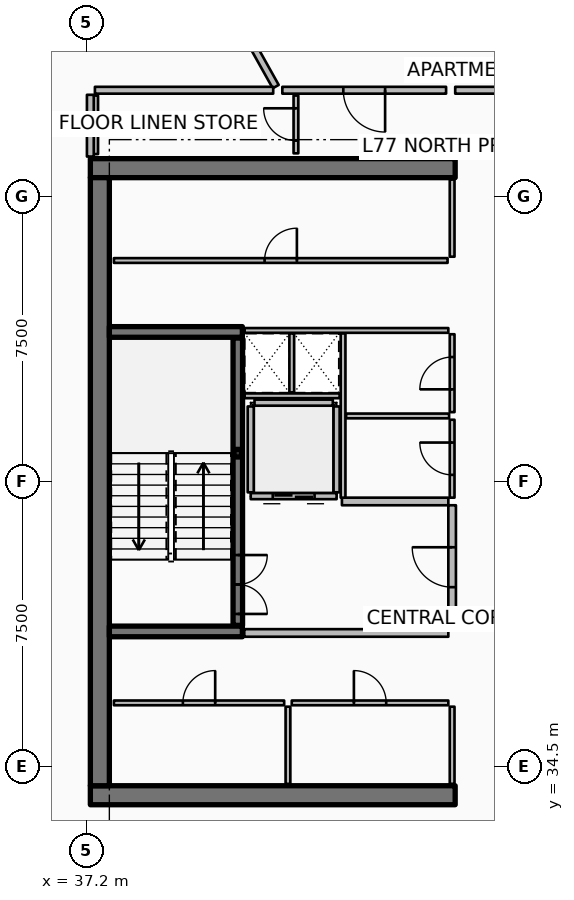
"""IFC4 building model, lengths in metres.
Left out: names, types, materials, properties, quantities, classifications, styles, units other than length and angle.
Written with IfcOpenShell. Run it as: python <this file> out.ifc"""

import sys

from ifc_helpers import new_model, si_unit, direction, frame, frame_2d, origin, origin_2d, place, context, subcontext, project, spatial, rectangle, hollow_rectangle, extrude, element, fill, save


model = new_model("IFC4")
c1 = context("Model", 3, precision=1e-05, world=origin(), true_north=direction((0.0, 1.0)))
c2 = subcontext(c1, "Body", "Model", "MODEL_VIEW")
j1 = project(units=[si_unit("LENGTHUNIT", "METRE"), si_unit("PLANEANGLEUNIT", "RADIAN")], contexts=[c1])
p1 = place(None, origin())
s1 = spatial("IfcSite", under=j1, at=p1, CompositionType="ELEMENT")
p2 = place(p1, origin())
s2 = spatial("IfcBuilding", under=s1, at=p2, CompositionType="ELEMENT")
p3 = place(p2, frame((0.0, 0.0, 306.0)))
s3 = spatial("IfcBuildingStorey", under=s2, at=p3, CompositionType="ELEMENT", Elevation=306.0)
for number, where, z_axis, x_axis in (
    (1, (37.3, 33.75, 0.0), (0.0, 0.0, 1.0), (1.0, 0.0, 0.0)),
    (2, (37.3, 50.25, 0.0), (0.0, 0.0, 1.0), (1.0, 0.0, 0.0)),
):
    element("IfcWall", number, at=place(p3, frame(where, z_axis=z_axis, x_axis=x_axis)), inside=s3, PredefinedType="SHEAR", context=c2, shape_type="SweptSolid", body=[
        extrude(rectangle(XDim=9.6, YDim=0.5, at=frame_2d((4.8, 0.0))), origin(), (0.0, 0.0, 1.0), 3.85),
    ])
p4 = place(p3, frame((37.55, 34.0, 0.0), z_axis=(0.0, 0.0, 1.0), x_axis=(0.0, 1.0, 0.0)))
e3 = element("IfcWall", 3, at=p4, inside=s3, PredefinedType="SHEAR", context=c2, shape_type="SweptSolid", body=[
    extrude(rectangle(XDim=16.0, YDim=0.5, at=frame_2d((8.0, 0.0))), origin(), (0.0, 0.0, 1.0), 3.85),
])
for number, where, z_axis, x_axis in (
    (4, (37.8, 38.06, 0.0), (0.0, 0.0, 1.0), (1.0, 0.0, 0.0)),
    (5, (37.8, 45.94, 0.0), (0.0, 0.0, 1.0), (1.0, 0.0, 0.0)),
):
    element("IfcWall", number, at=place(p3, frame(where, z_axis=z_axis, x_axis=x_axis)), inside=s3, PredefinedType="SHEAR", context=c2, shape_type="SweptSolid", body=[
        extrude(rectangle(XDim=3.5, YDim=0.28, at=frame_2d((1.75, 0.0))), origin(), (0.0, 0.0, 1.0), 3.85),
    ])
p5 = place(p3, frame((41.18, 42.75, 0.0), z_axis=(0.0, 0.0, 1.0), x_axis=(1.0, 0.0, 0.0)))
e6 = element("IfcColumn", 6, at=p5, inside=s3, PredefinedType="COLUMN", context=c2, shape_type="SweptSolid", body=[
    extrude(hollow_rectangle(XDim=0.2, YDim=0.2, WallThickness=0.01, InnerFilletRadius=0.01, OuterFilletRadius=0.02, at=origin_2d()), origin(), (0.0, 0.0, 1.0), 1.72),
])
p6 = place(p3, frame((41.18, 38.22, 0.0), z_axis=(0.0, 0.0, 1.0), x_axis=(0.0, 1.0, 0.0)))
e7 = element("IfcWall", 7, at=p6, inside=s3, PredefinedType="SOLIDWALL", context=c2, shape_type="SweptSolid", body=[
    extrude(rectangle(XDim=7.56, YDim=0.25, at=frame_2d((3.78, 0.0))), origin(), (0.0, 0.0, 1.0), 3.45),
])
p7 = place(p6, frame((0.3, 0.0, 0.0)))
e8 = element("IfcOpeningElement", 8, at=p7, cuts=e7, PredefinedType="OPENING", context=c2, shape_type="SweptSolid", body=[
    extrude(rectangle(XDim=1.55, YDim=2.15, at=frame_2d((0.775, 1.075))), frame((0.0, 0.135, 0.0), z_axis=(0.0, -1.0, 0.0), x_axis=(1.0, 0.0, 0.0)), (0.0, 0.0, 1.0), 0.27),
])
p8 = place(p3, frame((43.78, 41.62, 0.0), z_axis=(0.0, 0.0, 1.0), x_axis=(-1.0, 0.0, 0.0)))
e9 = element("IfcWall", 9, at=p8, inside=s3, PredefinedType="PARTITIONING", context=c2, shape_type="SweptSolid", body=[
    extrude(rectangle(XDim=2.26, YDim=0.16, at=frame_2d((1.13, 0.0))), origin(), (0.0, 0.0, 1.0), 3.45),
])
p9 = place(p8, frame((0.58, 0.0, 0.0)))
e10 = element("IfcOpeningElement", 10, at=p9, cuts=e9, PredefinedType="OPENING", context=c2, shape_type="SweptSolid", body=[
    extrude(rectangle(XDim=1.1, YDim=2.1, at=frame_2d((0.55, 1.05))), frame((0.0, 0.09, 0.0), z_axis=(0.0, -1.0, 0.0), x_axis=(1.0, 0.0, 0.0)), (0.0, 0.0, 1.0), 0.18),
])
for number, where, z_axis, x_axis in (
    (11, (43.78, 41.72, 0.0), (0.0, 0.0, 1.0), (0.0, 1.0, 0.0)),
    (12, (41.52, 41.72, 0.0), (0.0, 0.0, 1.0), (0.0, 1.0, 0.0)),
):
    element("IfcWall", number, at=place(p3, frame(where, z_axis=z_axis, x_axis=x_axis)), inside=s3, PredefinedType="PARTITIONING", context=c2, shape_type="SweptSolid", body=[
        extrude(rectangle(XDim=2.26, YDim=0.16, at=frame_2d((1.13, 0.0))), origin(), (0.0, 0.0, 1.0), 3.45),
    ])
p10 = place(p3, frame((41.62, 44.08, 0.0), z_axis=(0.0, 0.0, 1.0), x_axis=(1.0, 0.0, 0.0)))
e13 = element("IfcWall", 13, at=p10, inside=s3, PredefinedType="PARTITIONING", context=c2, shape_type="SweptSolid", body=[
    extrude(rectangle(XDim=2.06, YDim=0.16, at=frame_2d((1.03, 0.0))), origin(), (0.0, 0.0, 1.0), 3.45),
])
for number, where, z_axis, x_axis in (
    (14, (46.82, 34.05, 0.0), (0.0, 0.0, 1.0), (0.0, 1.0, 0.0)),
    (15, (42.5, 34.05, 0.0), (0.0, 0.0, 1.0), (0.0, 1.0, 0.0)),
):
    element("IfcWall", number, at=place(p3, frame(where, z_axis=z_axis, x_axis=x_axis)), inside=s3, PredefinedType="PARTITIONING", context=c2, shape_type="SweptSolid", body=[
        extrude(rectangle(XDim=2.03, YDim=0.125, at=frame_2d((1.015, 0.0))), origin(), (0.0, 0.0, 1.0), 2.89),
    ])
p11 = place(p3, frame((37.92, 36.18, 0.0), z_axis=(0.0, 0.0, 1.0), x_axis=(1.0, 0.0, 0.0)))
e16 = element("IfcWall", 16, at=p11, inside=s3, PredefinedType="PARTITIONING", context=c2, shape_type="SweptSolid", body=[
    extrude(rectangle(XDim=4.48, YDim=0.125, at=frame_2d((2.24, 0.0))), origin(), (0.0, 0.0, 1.0), 2.89),
])
p12 = place(p11, frame((1.815, 0.0, 0.0)))
e17 = element("IfcOpeningElement", 17, at=p12, cuts=e16, PredefinedType="OPENING", context=c2, shape_type="SweptSolid", body=[
    extrude(rectangle(XDim=0.85, YDim=2.06, at=frame_2d((0.425, 1.03))), frame((0.0, 0.073, 0.0), z_axis=(0.0, -1.0, 0.0), x_axis=(1.0, 0.0, 0.0)), (0.0, 0.0, 1.0), 0.145),
])
p13 = place(p3, frame((42.6, 36.18, 0.0), z_axis=(0.0, 0.0, 1.0), x_axis=(1.0, 0.0, 0.0)))
e18 = element("IfcWall", 18, at=p13, inside=s3, PredefinedType="PARTITIONING", context=c2, shape_type="SweptSolid", body=[
    extrude(rectangle(XDim=4.12, YDim=0.125, at=frame_2d((2.06, 0.0))), origin(), (0.0, 0.0, 1.0), 2.89),
])
p14 = place(p13, frame((1.635, 0.0, 0.0)))
e19 = element("IfcOpeningElement", 19, at=p14, cuts=e18, PredefinedType="OPENING", context=c2, shape_type="SweptSolid", body=[
    extrude(rectangle(XDim=0.85, YDim=2.06, at=frame_2d((0.425, 1.03))), frame((0.0, 0.073, 0.0), z_axis=(0.0, -1.0, 0.0), x_axis=(1.0, 0.0, 0.0)), (0.0, 0.0, 1.0), 0.145),
])
p15 = place(p3, frame((46.82, 47.92, 0.0), z_axis=(0.0, 0.0, 1.0), x_axis=(0.0, 1.0, 0.0)))
e20 = element("IfcWall", 20, at=p15, inside=s3, PredefinedType="PARTITIONING", context=c2, shape_type="SweptSolid", body=[
    extrude(rectangle(XDim=2.03, YDim=0.125, at=frame_2d((1.015, 0.0))), origin(), (0.0, 0.0, 1.0), 2.89),
])
p16 = place(p3, frame((37.92, 47.82, 0.0), z_axis=(0.0, 0.0, 1.0), x_axis=(1.0, 0.0, 0.0)))
e21 = element("IfcWall", 21, at=p16, inside=s3, PredefinedType="PARTITIONING", context=c2, shape_type="SweptSolid", body=[
    extrude(rectangle(XDim=8.78, YDim=0.125, at=frame_2d((4.39, 0.0))), origin(), (0.0, 0.0, 1.0), 2.89),
])
p17 = place(p16, frame((3.965, 0.0, 0.0)))
e22 = element("IfcOpeningElement", 22, at=p17, cuts=e21, PredefinedType="OPENING", context=c2, shape_type="SweptSolid", body=[
    extrude(rectangle(XDim=0.85, YDim=2.06, at=frame_2d((0.425, 1.03))), frame((0.0, 0.073, 0.0), z_axis=(0.0, -1.0, 0.0), x_axis=(1.0, 0.0, 0.0)), (0.0, 0.0, 1.0), 0.145),
])
p18 = place(p3, frame((41.35, 38.02, 0.0), z_axis=(0.0, 0.0, 1.0), x_axis=(1.0, 0.0, 0.0)))
e23 = element("IfcWall", 23, at=p18, inside=s3, PredefinedType="PARTITIONING", context=c2, shape_type="SweptSolid", body=[
    extrude(rectangle(XDim=5.37, YDim=0.2, at=frame_2d((2.685, 0.0))), origin(), (0.0, 0.0, 1.0), 3.45),
])
p19 = place(p3, frame((43.92, 41.48, 0.0), z_axis=(0.0, 0.0, 1.0), x_axis=(1.0, 0.0, 0.0)))
e24 = element("IfcWall", 24, at=p19, inside=s3, PredefinedType="PARTITIONING", context=c2, shape_type="SweptSolid", body=[
    extrude(rectangle(XDim=2.8, YDim=0.2, at=frame_2d((1.4, 0.0))), origin(), (0.0, 0.0, 1.0), 3.45),
])
p20 = place(p3, frame((46.82, 38.12, 0.0), z_axis=(0.0, 0.0, 1.0), x_axis=(0.0, 1.0, 0.0)))
e25 = element("IfcWall", 25, at=p20, inside=s3, PredefinedType="PARTITIONING", context=c2, shape_type="SweptSolid", body=[
    extrude(rectangle(XDim=3.26, YDim=0.2, at=frame_2d((1.63, 0.0))), origin(), (0.0, 0.0, 1.0), 3.45),
])
p21 = place(p20, frame((1.105, 0.0, 0.0)))
e26 = element("IfcOpeningElement", 26, at=p21, cuts=e25, PredefinedType="OPENING", context=c2, shape_type="SweptSolid", body=[
    extrude(rectangle(XDim=1.05, YDim=2.1, at=frame_2d((0.525, 1.05))), frame((0.0, 0.11, 0.0), z_axis=(0.0, -1.0, 0.0), x_axis=(1.0, 0.0, 0.0)), (0.0, 0.0, 1.0), 0.22),
])
p22 = place(p3, frame((41.36, 45.98, 0.0), z_axis=(0.0, 0.0, 1.0), x_axis=(1.0, 0.0, 0.0)))
e27 = element("IfcWall", 27, at=p22, inside=s3, PredefinedType="PARTITIONING", context=c2, shape_type="SweptSolid", body=[
    extrude(rectangle(XDim=5.36, YDim=0.125, at=frame_2d((2.68, 0.0))), origin(), (0.0, 0.0, 1.0), 2.89),
])
p23 = place(p3, frame((41.36, 44.26, 0.0), z_axis=(0.0, 0.0, 1.0), x_axis=(1.0, 0.0, 0.0)))
e28 = element("IfcWall", 28, at=p23, inside=s3, PredefinedType="PARTITIONING", context=c2, shape_type="SweptSolid", body=[
    extrude(rectangle(XDim=2.5, YDim=0.125, at=frame_2d((1.25, 0.0))), origin(), (0.0, 0.0, 1.0), 2.89),
])
p24 = place(p3, frame((42.6, 44.35, 0.0), z_axis=(0.0, 0.0, 1.0), x_axis=(0.0, 1.0, 0.0)))
e29 = element("IfcWall", 29, at=p24, inside=s3, PredefinedType="PARTITIONING", context=c2, shape_type="SweptSolid", body=[
    extrude(rectangle(XDim=1.55, YDim=0.125, at=frame_2d((0.775, 0.0))), origin(), (0.0, 0.0, 1.0), 2.89),
])
p25 = place(p3, frame((43.95, 41.58, 0.0), z_axis=(0.0, 0.0, 1.0), x_axis=(0.0, 1.0, 0.0)))
e30 = element("IfcWall", 30, at=p25, inside=s3, PredefinedType="PARTITIONING", context=c2, shape_type="SweptSolid", body=[
    extrude(rectangle(XDim=4.32, YDim=0.125, at=frame_2d((2.16, 0.0))), origin(), (0.0, 0.0, 1.0), 2.89),
])
p26 = place(p3, frame((44.03, 43.73, 0.0), z_axis=(0.0, 0.0, 1.0), x_axis=(1.0, 0.0, 0.0)))
e31 = element("IfcWall", 31, at=p26, inside=s3, PredefinedType="PARTITIONING", context=c2, shape_type="SweptSolid", body=[
    extrude(rectangle(XDim=2.71, YDim=0.125, at=frame_2d((1.355, 0.0))), origin(), (0.0, 0.0, 1.0), 2.89),
])
p27 = place(p3, frame((46.82, 41.58, 0.0), z_axis=(0.0, 0.0, 1.0), x_axis=(0.0, 1.0, 0.0)))
e32 = element("IfcWall", 32, at=p27, inside=s3, PredefinedType="PARTITIONING", context=c2, shape_type="SweptSolid", body=[
    extrude(rectangle(XDim=2.05, YDim=0.125, at=frame_2d((1.025, 0.0))), origin(), (0.0, 0.0, 1.0), 2.89),
])
p28 = place(p27, frame((0.6, 0.0, 0.0)))
e33 = element("IfcOpeningElement", 33, at=p28, cuts=e32, PredefinedType="OPENING", context=c2, shape_type="SweptSolid", body=[
    extrude(rectangle(XDim=0.85, YDim=2.06, at=frame_2d((0.425, 1.03))), frame((0.0, 0.073, 0.0), z_axis=(0.0, -1.0, 0.0), x_axis=(1.0, 0.0, 0.0)), (0.0, 0.0, 1.0), 0.145),
])
p29 = place(p3, frame((46.82, 43.83, 0.0), z_axis=(0.0, 0.0, 1.0), x_axis=(0.0, 1.0, 0.0)))
e34 = element("IfcWall", 34, at=p29, inside=s3, PredefinedType="PARTITIONING", context=c2, shape_type="SweptSolid", body=[
    extrude(rectangle(XDim=2.05, YDim=0.125, at=frame_2d((1.025, 0.0))), origin(), (0.0, 0.0, 1.0), 2.89),
])
p30 = place(p29, frame((0.6, 0.0, 0.0)))
e35 = element("IfcOpeningElement", 35, at=p30, cuts=e34, PredefinedType="OPENING", context=c2, shape_type="SweptSolid", body=[
    extrude(rectangle(XDim=0.85, YDim=2.06, at=frame_2d((0.425, 1.03))), frame((0.0, 0.073, 0.0), z_axis=(0.0, -1.0, 0.0), x_axis=(1.0, 0.0, 0.0)), (0.0, 0.0, 1.0), 0.145),
])
p31 = place(p3, frame((37.44, 50.62, 0.0), z_axis=(0.0, 0.0, 1.0), x_axis=(0.0, 1.0, 0.0)))
e36 = element("IfcWall", 36, at=p31, inside=s3, PredefinedType="PARTITIONING", context=c2, shape_type="SweptSolid", body=[
    extrude(rectangle(XDim=1.54, YDim=0.125, at=frame_2d((0.77, 0.0))), origin(), (0.0, 0.0, 1.0), 2.407),
])
p32 = place(p3, frame((42.71, 50.64, 0.0), z_axis=(0.0, 0.0, 1.0), x_axis=(0.0, 1.0, 0.0)))
e37 = element("IfcWall", 37, at=p32, inside=s3, PredefinedType="PARTITIONING", context=c2, shape_type="SweptSolid", body=[
    extrude(rectangle(XDim=1.52, YDim=0.125, at=frame_2d((0.76, 0.0))), origin(), (0.0, 0.0, 1.0), 2.407),
])
p33 = place(p32, frame((0.335, 0.0, 0.0)))
e38 = element("IfcOpeningElement", 38, at=p33, cuts=e37, PredefinedType="OPENING", context=c2, shape_type="SweptSolid", body=[
    extrude(rectangle(XDim=0.85, YDim=2.06, at=frame_2d((0.425, 1.03))), frame((0.0, 0.073, 0.0), z_axis=(0.0, -1.0, 0.0), x_axis=(1.0, 0.0, 0.0)), (0.0, 0.0, 1.0), 0.145),
])
p34 = place(p3, frame((42.178, 52.396, 0.0), z_axis=(0.0, 0.0, 1.0), x_axis=(-0.488621436647, 0.872495897783, 0.0)))
e39 = element("IfcWall", 39, at=p34, inside=s3, PredefinedType="PARTITIONING", context=c2, shape_type="SweptSolid", body=[
    extrude(rectangle(XDim=11.521, YDim=0.18, at=frame_2d((5.76, 0.0))), origin(), (0.0, 0.0, 1.0), 2.407),
])
p35 = place(p3, frame((46.661, 52.3, 0.0), z_axis=(0.0, 0.0, 1.0), x_axis=(-1.0, 0.0, 0.0)))
e40 = element("IfcWall", 40, at=p35, inside=s3, PredefinedType="PARTITIONING", context=c2, shape_type="SweptSolid", body=[
    extrude(rectangle(XDim=4.309, YDim=0.18, at=frame_2d((2.155, 0.0))), origin(), (0.0, 0.0, 1.0), 2.407),
])
p36 = place(p35, frame((1.604, 0.0, 0.0)))
e41 = element("IfcOpeningElement", 41, at=p36, cuts=e40, PredefinedType="OPENING", context=c2, shape_type="SweptSolid", body=[
    extrude(rectangle(XDim=1.1, YDim=2.1, at=frame_2d((0.55, 1.05))), frame((0.0, 0.1, 0.0), z_axis=(0.0, -1.0, 0.0), x_axis=(1.0, 0.0, 0.0)), (0.0, 0.0, 1.0), 0.2),
])
p37 = place(p3, frame((50.785, 52.3, 0.0), z_axis=(0.0, 0.0, 1.0), x_axis=(-1.0, 0.0, 0.0)))
e42 = element("IfcWall", 42, at=p37, inside=s3, PredefinedType="PARTITIONING", context=c2, shape_type="SweptSolid", body=[
    extrude(rectangle(XDim=3.884, YDim=0.18, at=frame_2d((1.942, 0.0))), origin(), (0.0, 0.0, 1.0), 2.407),
])
p38 = place(p3, frame((42.112, 52.3, 0.0), z_axis=(0.0, 0.0, 1.0), x_axis=(-1.0, 0.0, 0.0)))
e43 = element("IfcWall", 43, at=p38, inside=s3, PredefinedType="PARTITIONING", context=c2, shape_type="SweptSolid", body=[
    extrude(rectangle(XDim=4.692, YDim=0.18, at=frame_2d((2.346, 0.0))), origin(), (0.0, 0.0, 1.0), 2.407),
])
p39 = place(p3, frame((37.3, 52.18, 0.0), z_axis=(0.0, 0.0, 1.0), x_axis=(0.0, -1.0, 0.0)))
e44 = element("IfcWall", 44, at=p39, inside=s3, PredefinedType="PARTITIONING", context=c2, shape_type="SweptSolid", body=[
    extrude(rectangle(XDim=1.625, YDim=0.18, at=frame_2d((0.812, 0.0))), origin(), (0.0, 0.0, 1.0), 2.407),
])
p40 = place(p3, frame((37.242, 55.847, 0.0), z_axis=(0.0, 0.0, 1.0), x_axis=(-0.711391624602, -0.702795814192, 0.0)))
e45 = element("IfcWall", 45, at=p40, inside=s3, PredefinedType="PARTITIONING", context=c2, shape_type="SweptSolid", body=[
    extrude(rectangle(XDim=4.147, YDim=0.125, at=frame_2d((2.073, 0.0))), origin(), (0.0, 0.0, 1.0), 2.407),
])
p41 = place(p40, frame((1.623, 0.0, 0.0)))
e46 = element("IfcOpeningElement", 46, at=p41, cuts=e45, PredefinedType="OPENING", context=c2, shape_type="SweptSolid", body=[
    extrude(rectangle(XDim=0.9, YDim=2.08, at=frame_2d((0.45, 1.04))), frame((0.0, 0.073, 0.0), z_axis=(0.0, -1.0, 0.0), x_axis=(1.0, 0.0, 0.0)), (0.0, 0.0, 1.0), 0.145),
])
p42 = place(p7, origin())
e47 = element("IfcDoor", 47, at=p42, inside=s3, OperationType="DOUBLE_DOOR_SINGLE_SWING", PredefinedType="DOOR", context=c2, shape_type="SweptSolid", body=[
    extrude(rectangle(XDim=1.55, YDim=2.15, at=frame_2d((0.775, 1.075))), frame((0.0, 0.025, 0.0), z_axis=(0.0, -1.0, 0.0), x_axis=(1.0, 0.0, 0.0)), (0.0, 0.0, 1.0), 0.05),
])
fill(e8, e47)
p43 = place(p9, origin())
e48 = element("IfcDoor", 48, at=p43, inside=s3, OperationType="DOUBLE_DOOR_SLIDING", PredefinedType="DOOR", context=c2, shape_type="SweptSolid", body=[
    extrude(rectangle(XDim=1.1, YDim=2.1, at=frame_2d((0.55, 1.05))), frame((0.0, 0.025, 0.0), z_axis=(0.0, -1.0, 0.0), x_axis=(1.0, 0.0, 0.0)), (0.0, 0.0, 1.0), 0.05),
])
fill(e10, e48)
p44 = place(p12, origin())
e49 = element("IfcDoor", 49, at=p44, inside=s3, OperationType="SINGLE_SWING_RIGHT", PredefinedType="DOOR", context=c2, shape_type="SweptSolid", body=[
    extrude(rectangle(XDim=0.85, YDim=2.06, at=frame_2d((0.425, 1.03))), frame((0.0, 0.025, 0.0), z_axis=(0.0, -1.0, 0.0), x_axis=(1.0, 0.0, 0.0)), (0.0, 0.0, 1.0), 0.05),
])
fill(e17, e49)
p45 = place(p14, origin())
e50 = element("IfcDoor", 50, at=p45, inside=s3, OperationType="SINGLE_SWING_LEFT", PredefinedType="DOOR", context=c2, shape_type="SweptSolid", body=[
    extrude(rectangle(XDim=0.85, YDim=2.06, at=frame_2d((0.425, 1.03))), frame((0.0, 0.025, 0.0), z_axis=(0.0, -1.0, 0.0), x_axis=(1.0, 0.0, 0.0)), (0.0, 0.0, 1.0), 0.05),
])
fill(e19, e50)
p46 = place(p17, origin())
e51 = element("IfcDoor", 51, at=p46, inside=s3, OperationType="SINGLE_SWING_RIGHT", PredefinedType="DOOR", context=c2, shape_type="SweptSolid", body=[
    extrude(rectangle(XDim=0.85, YDim=2.06, at=frame_2d((0.425, 1.03))), frame((0.0, 0.025, 0.0), z_axis=(0.0, -1.0, 0.0), x_axis=(1.0, 0.0, 0.0)), (0.0, 0.0, 1.0), 0.05),
])
fill(e22, e51)
p47 = place(p21, origin())
e52 = element("IfcDoor", 52, at=p47, inside=s3, OperationType="SINGLE_SWING_RIGHT", PredefinedType="DOOR", context=c2, shape_type="SweptSolid", body=[
    extrude(rectangle(XDim=1.05, YDim=2.1, at=frame_2d((0.525, 1.05))), frame((0.0, 0.025, 0.0), z_axis=(0.0, -1.0, 0.0), x_axis=(1.0, 0.0, 0.0)), (0.0, 0.0, 1.0), 0.05),
])
fill(e26, e52)
p48 = place(p28, origin())
e53 = element("IfcDoor", 53, at=p48, inside=s3, OperationType="SINGLE_SWING_RIGHT", PredefinedType="DOOR", context=c2, shape_type="SweptSolid", body=[
    extrude(rectangle(XDim=0.85, YDim=2.06, at=frame_2d((0.425, 1.03))), frame((0.0, 0.025, 0.0), z_axis=(0.0, -1.0, 0.0), x_axis=(1.0, 0.0, 0.0)), (0.0, 0.0, 1.0), 0.05),
])
fill(e33, e53)
p49 = place(p30, origin())
e54 = element("IfcDoor", 54, at=p49, inside=s3, OperationType="SINGLE_SWING_LEFT", PredefinedType="DOOR", context=c2, shape_type="SweptSolid", body=[
    extrude(rectangle(XDim=0.85, YDim=2.06, at=frame_2d((0.425, 1.03))), frame((0.0, 0.025, 0.0), z_axis=(0.0, -1.0, 0.0), x_axis=(1.0, 0.0, 0.0)), (0.0, 0.0, 1.0), 0.05),
])
fill(e35, e54)
p50 = place(p33, origin())
e55 = element("IfcDoor", 55, at=p50, inside=s3, OperationType="SINGLE_SWING_RIGHT", PredefinedType="DOOR", context=c2, shape_type="SweptSolid", body=[
    extrude(rectangle(XDim=0.85, YDim=2.06, at=frame_2d((0.425, 1.03))), frame((0.0, 0.025, 0.0), z_axis=(0.0, -1.0, 0.0), x_axis=(1.0, 0.0, 0.0)), (0.0, 0.0, 1.0), 0.05),
])
fill(e38, e55)
p51 = place(p36, origin())
e56 = element("IfcDoor", 56, at=p51, inside=s3, OperationType="SINGLE_SWING_LEFT", PredefinedType="DOOR", context=c2, shape_type="SweptSolid", body=[
    extrude(rectangle(XDim=1.1, YDim=2.1, at=frame_2d((0.55, 1.05))), frame((0.0, 0.025, 0.0), z_axis=(0.0, -1.0, 0.0), x_axis=(1.0, 0.0, 0.0)), (0.0, 0.0, 1.0), 0.05),
])
fill(e41, e56)
save(model, sys.argv[1])
